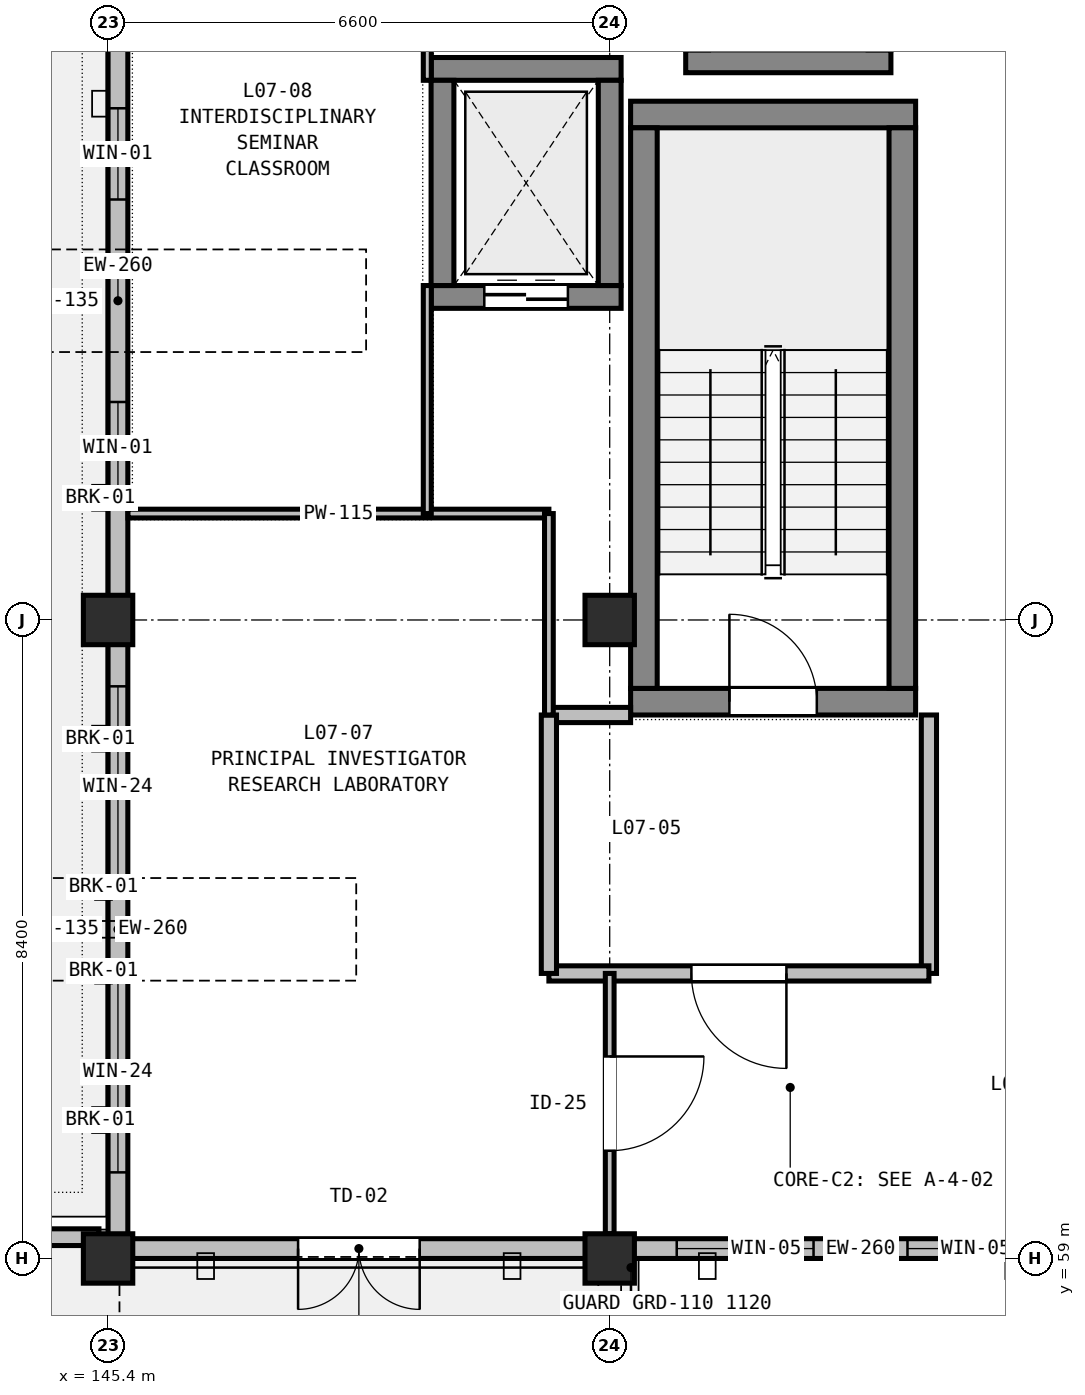
"""IFC4 building model, lengths in metres.
Left out: names, types, materials, properties, quantities, classifications, styles, units other than length and angle.
Written with IfcOpenShell. Run it as: python <this file> out.ifc"""

import sys

from ifc_helpers import new_model, si_unit, direction, frame, frame_2d, origin, origin_2d, place, context, subcontext, project, spatial, rectangle, extrude, element, fill, save


model = new_model("IFC4")
c1 = context("Model", 3, precision=1e-05, world=origin(), true_north=direction((0.0, 1.0)))
c2 = subcontext(c1, "Body", "Model", "MODEL_VIEW")
j1 = project(units=[si_unit("LENGTHUNIT", "METRE"), si_unit("PLANEANGLEUNIT", "RADIAN")], contexts=[c1])
p1 = place(None, origin())
s1 = spatial("IfcSite", under=j1, at=p1, CompositionType="ELEMENT")
p2 = place(p1, origin())
s2 = spatial("IfcBuilding", under=s1, at=p2, CompositionType="ELEMENT")
p3 = place(p2, frame((0.0, 0.0, 32.7)))
s3 = spatial("IfcBuildingStorey", under=s2, at=p3, CompositionType="ELEMENT", Elevation=32.7)
for number, where, z_axis, x_axis in (
    (1, (145.4, 59.0, 0.0), (0.0, 0.0, 1.0), (1.0, 0.0, 0.0)),
    (2, (145.4, 67.4, 0.0), (0.0, 0.0, 1.0), (1.0, 0.0, 0.0)),
    (3, (152.0, 59.0, 0.0), (0.0, 0.0, 1.0), (1.0, 0.0, 0.0)),
    (4, (152.0, 67.4, 0.0), (0.0, 0.0, 1.0), (1.0, 0.0, 0.0)),
):
    element("IfcColumn", number, at=place(p3, frame(where, z_axis=z_axis, x_axis=x_axis)), inside=s3, PredefinedType="COLUMN", context=c2, shape_type="SweptSolid", body=[
        extrude(rectangle(XDim=0.65, YDim=0.65, at=origin_2d()), origin(), (0.0, 0.0, 1.0), 3.9),
    ])
p4 = place(p3, frame((152.275, 66.325, 0.0), z_axis=(0.0, 0.0, 1.0), x_axis=(1.0, 0.0, 0.0)))
e5 = element("IfcWall", 5, at=p4, inside=s3, PredefinedType="SHEAR", context=c2, shape_type="SweptSolid", body=[
    extrude(rectangle(XDim=3.75, YDim=0.35, at=frame_2d((1.875, 0.0))), origin(), (0.0, 0.0, 1.0), 3.9),
])
p5 = place(p4, frame((1.3, 0.0, 0.0)))
e6 = element("IfcOpeningElement", 6, at=p5, cuts=e5, PredefinedType="OPENING", context=c2, shape_type="SweptSolid", body=[
    extrude(rectangle(XDim=1.15, YDim=2.15, at=frame_2d((0.575, 1.075))), frame((0.0, 0.185, 0.0), z_axis=(0.0, -1.0, 0.0), x_axis=(1.0, 0.0, 0.0)), (0.0, 0.0, 1.0), 0.37),
])
p6 = place(p3, frame((152.275, 74.05, 0.0), z_axis=(0.0, 0.0, 1.0), x_axis=(1.0, 0.0, 0.0)))
e7 = element("IfcWall", 7, at=p6, inside=s3, PredefinedType="SHEAR", context=c2, shape_type="SweptSolid", body=[
    extrude(rectangle(XDim=3.75, YDim=0.35, at=frame_2d((1.875, 0.0))), origin(), (0.0, 0.0, 1.0), 3.9),
])
for number, where, z_axis, x_axis in (
    (8, (152.45, 66.5, 0.0), (0.0, 0.0, 1.0), (0.0, 1.0, 0.0)),
    (9, (155.85, 66.5, 0.0), (0.0, 0.0, 1.0), (0.0, 1.0, 0.0)),
):
    element("IfcWall", number, at=place(p3, frame(where, z_axis=z_axis, x_axis=x_axis)), inside=s3, PredefinedType="SHEAR", context=c2, shape_type="SweptSolid", body=[
        extrude(rectangle(XDim=7.375, YDim=0.35, at=frame_2d((3.688, 0.0))), origin(), (0.0, 0.0, 1.0), 3.9),
    ])
p7 = place(p3, frame((149.65, 71.65, 0.0), z_axis=(0.0, 0.0, 1.0), x_axis=(1.0, 0.0, 0.0)))
e10 = element("IfcWall", 10, at=p7, inside=s3, PredefinedType="SHEAR", context=c2, shape_type="SweptSolid", body=[
    extrude(rectangle(XDim=2.5, YDim=0.3, at=frame_2d((1.25, 0.0))), origin(), (0.0, 0.0, 1.0), 3.9),
])
p8 = place(p7, frame((0.7, 0.0, 0.0)))
e11 = element("IfcOpeningElement", 11, at=p8, cuts=e10, PredefinedType="OPENING", context=c2, shape_type="SweptSolid", body=[
    extrude(rectangle(XDim=1.1, YDim=2.1, at=frame_2d((0.55, 1.05))), frame((0.0, 0.16, 0.0), z_axis=(0.0, -1.0, 0.0), x_axis=(1.0, 0.0, 0.0)), (0.0, 0.0, 1.0), 0.32),
])
p9 = place(p3, frame((149.65, 74.65, 0.0), z_axis=(0.0, 0.0, 1.0), x_axis=(1.0, 0.0, 0.0)))
e12 = element("IfcWall", 12, at=p9, inside=s3, PredefinedType="SHEAR", context=c2, shape_type="SweptSolid", body=[
    extrude(rectangle(XDim=2.5, YDim=0.3, at=frame_2d((1.25, 0.0))), origin(), (0.0, 0.0, 1.0), 3.9),
])
for number, where, z_axis, x_axis in (
    (13, (149.8, 71.8, 0.0), (0.0, 0.0, 1.0), (0.0, 1.0, 0.0)),
    (14, (152.0, 71.8, 0.0), (0.0, 0.0, 1.0), (0.0, 1.0, 0.0)),
    (15, (153.0, 74.75, 0.0), (0.0, 0.0, 1.0), (1.0, 0.0, 0.0)),
):
    element("IfcWall", number, at=place(p3, frame(where, z_axis=z_axis, x_axis=x_axis)), inside=s3, PredefinedType="SHEAR", context=c2, shape_type="SweptSolid", body=[
        extrude(rectangle(XDim=2.7, YDim=0.3, at=frame_2d((1.35, 0.0))), origin(), (0.0, 0.0, 1.0), 3.9),
    ])
p10 = place(p3, frame((145.53, 59.26, 0.0), z_axis=(0.0, 0.0, 1.0), x_axis=(0.0, 1.0, 0.0)))
e16 = element("IfcWall", 16, at=p10, inside=s3, PredefinedType="STANDARD", context=c2, shape_type="SweptSolid", body=[
    extrude(rectangle(XDim=8.14, YDim=0.26, at=frame_2d((4.07, 0.0))), origin(), (0.0, 0.0, 1.0), 3.285),
])
p11 = place(p10, frame((0.873, 0.0, 0.9)))
e17 = element("IfcOpeningElement", 17, at=p11, cuts=e16, PredefinedType="OPENING", context=c2, shape_type="SweptSolid", body=[
    extrude(rectangle(XDim=2.65, YDim=1.85, at=frame_2d((1.325, 0.925))), frame((0.0, 0.14, 0.0), z_axis=(0.0, -1.0, 0.0), x_axis=(1.0, 0.0, 0.0)), (0.0, 0.0, 1.0), 0.28),
])
p12 = place(p10, frame((4.617, 0.0, 0.9)))
e18 = element("IfcOpeningElement", 18, at=p12, cuts=e16, PredefinedType="OPENING", context=c2, shape_type="SweptSolid", body=[
    extrude(rectangle(XDim=2.65, YDim=1.85, at=frame_2d((1.325, 0.925))), frame((0.0, 0.14, 0.0), z_axis=(0.0, -1.0, 0.0), x_axis=(1.0, 0.0, 0.0)), (0.0, 0.0, 1.0), 0.28),
])
p13 = place(p3, frame((145.53, 67.4, 0.0), z_axis=(0.0, 0.0, 1.0), x_axis=(0.0, 1.0, 0.0)))
e19 = element("IfcWall", 19, at=p13, inside=s3, PredefinedType="STANDARD", context=c2, shape_type="SweptSolid", body=[
    extrude(rectangle(XDim=8.4, YDim=0.26, at=frame_2d((4.2, 0.0))), origin(), (0.0, 0.0, 1.0), 3.285),
])
p14 = place(p13, frame((1.668, 0.0, 0.9)))
e20 = element("IfcOpeningElement", 20, at=p14, cuts=e19, PredefinedType="OPENING", context=c2, shape_type="SweptSolid", body=[
    extrude(rectangle(XDim=1.2, YDim=2.1, at=frame_2d((0.6, 1.05))), frame((0.0, 0.14, 0.0), z_axis=(0.0, -1.0, 0.0), x_axis=(1.0, 0.0, 0.0)), (0.0, 0.0, 1.0), 0.28),
])
p15 = place(p13, frame((5.532, 0.0, 0.9)))
e21 = element("IfcOpeningElement", 21, at=p15, cuts=e19, PredefinedType="OPENING", context=c2, shape_type="SweptSolid", body=[
    extrude(rectangle(XDim=1.2, YDim=2.1, at=frame_2d((0.6, 1.05))), frame((0.0, 0.14, 0.0), z_axis=(0.0, -1.0, 0.0), x_axis=(1.0, 0.0, 0.0)), (0.0, 0.0, 1.0), 0.28),
])
p16 = place(p3, frame((158.6, 59.13, 0.0), z_axis=(0.0, 0.0, 1.0), x_axis=(-1.0, 0.0, 0.0)))
e22 = element("IfcWall", 22, at=p16, inside=s3, PredefinedType="STANDARD", context=c2, shape_type="SweptSolid", body=[
    extrude(rectangle(XDim=6.6, YDim=0.26, at=frame_2d((3.3, 0.0))), origin(), (0.0, 0.0, 1.0), 3.185),
])
p17 = place(p16, frame((0.882, 0.0, 0.9)))
e23 = element("IfcOpeningElement", 23, at=p17, cuts=e22, PredefinedType="OPENING", context=c2, shape_type="SweptSolid", body=[
    extrude(rectangle(XDim=1.8, YDim=2.1, at=frame_2d((0.9, 1.05))), frame((0.0, 0.14, 0.0), z_axis=(0.0, -1.0, 0.0), x_axis=(1.0, 0.0, 0.0)), (0.0, 0.0, 1.0), 0.28),
])
p18 = place(p16, frame((3.918, 0.0, 0.9)))
e24 = element("IfcOpeningElement", 24, at=p18, cuts=e22, PredefinedType="OPENING", context=c2, shape_type="SweptSolid", body=[
    extrude(rectangle(XDim=1.8, YDim=2.1, at=frame_2d((0.9, 1.05))), frame((0.0, 0.14, 0.0), z_axis=(0.0, -1.0, 0.0), x_axis=(1.0, 0.0, 0.0)), (0.0, 0.0, 1.0), 0.28),
])
p19 = place(p3, frame((152.0, 59.13, 0.0), z_axis=(0.0, 0.0, 1.0), x_axis=(-1.0, 0.0, 0.0)))
e25 = element("IfcWall", 25, at=p19, inside=s3, PredefinedType="STANDARD", context=c2, shape_type="SweptSolid", body=[
    extrude(rectangle(XDim=6.6, YDim=0.26, at=frame_2d((3.3, 0.0))), origin(), (0.0, 0.0, 1.0), 3.185),
])
p20 = place(p19, frame((2.5, 0.0, 0.0)))
e26 = element("IfcOpeningElement", 26, at=p20, cuts=e25, PredefinedType="OPENING", context=c2, shape_type="SweptSolid", body=[
    extrude(rectangle(XDim=1.6, YDim=2.2, at=frame_2d((0.8, 1.1))), frame((0.0, 0.14, 0.0), z_axis=(0.0, -1.0, 0.0), x_axis=(1.0, 0.0, 0.0)), (0.0, 0.0, 1.0), 0.28),
])
p21 = place(p3, frame((138.52, 59.28, 0.0), z_axis=(0.0, 0.0, 1.0), x_axis=(1.0, 0.0, 0.0)))
e27 = element("IfcWall", 27, at=p21, inside=s3, PredefinedType="PARAPET", context=c2, shape_type="SweptSolid", body=[
    extrude(rectangle(XDim=6.76, YDim=0.22, at=frame_2d((3.38, 0.0))), origin(), (0.0, 0.0, 1.0), 1.12),
])
p22 = place(p3, frame((151.2, 66.15, 0.0), z_axis=(0.0, 0.0, 1.0), x_axis=(1.0, 0.0, 0.0)))
e28 = element("IfcWall", 28, at=p22, inside=s3, PredefinedType="PARTITIONING", context=c2, shape_type="SweptSolid", body=[
    extrude(rectangle(XDim=1.075, YDim=0.2, at=frame_2d((0.538, 0.0))), origin(), (0.0, 0.0, 1.0), 3.185),
])
p23 = place(p3, frame((156.2, 66.15, 0.0), z_axis=(0.0, 0.0, 1.0), x_axis=(0.0, -1.0, 0.0)))
e29 = element("IfcWall", 29, at=p23, inside=s3, PredefinedType="PARTITIONING", context=c2, shape_type="SweptSolid", body=[
    extrude(rectangle(XDim=3.4, YDim=0.2, at=frame_2d((1.7, 0.0))), origin(), (0.0, 0.0, 1.0), 3.635),
])
p24 = place(p3, frame((156.2, 62.75, 0.0), z_axis=(0.0, 0.0, 1.0), x_axis=(-1.0, 0.0, 0.0)))
e30 = element("IfcWall", 30, at=p24, inside=s3, PredefinedType="PARTITIONING", context=c2, shape_type="SweptSolid", body=[
    extrude(rectangle(XDim=5.0, YDim=0.2, at=frame_2d((2.5, 0.0))), origin(), (0.0, 0.0, 1.0), 3.185),
])
p25 = place(p24, frame((1.875, 0.0, 0.0)))
e31 = element("IfcOpeningElement", 31, at=p25, cuts=e30, PredefinedType="OPENING", context=c2, shape_type="SweptSolid", body=[
    extrude(rectangle(XDim=1.25, YDim=2.15, at=frame_2d((0.625, 1.075))), frame((0.0, 0.11, 0.0), z_axis=(0.0, -1.0, 0.0), x_axis=(1.0, 0.0, 0.0)), (0.0, 0.0, 1.0), 0.22),
])
p26 = place(p3, frame((151.2, 62.75, 0.0), z_axis=(0.0, 0.0, 1.0), x_axis=(0.0, 1.0, 0.0)))
e32 = element("IfcWall", 32, at=p26, inside=s3, PredefinedType="PARTITIONING", context=c2, shape_type="SweptSolid", body=[
    extrude(rectangle(XDim=3.4, YDim=0.2, at=frame_2d((1.7, 0.0))), origin(), (0.0, 0.0, 1.0), 3.635),
])
p27 = place(p3, frame((145.662, 68.8, 0.0), z_axis=(0.0, 0.0, 1.0), x_axis=(1.0, 0.0, 0.0)))
e33 = element("IfcWall", 33, at=p27, inside=s3, PredefinedType="PARTITIONING", context=c2, shape_type="SweptSolid", body=[
    extrude(rectangle(XDim=5.538, YDim=0.115, at=frame_2d((2.769, 0.0))), origin(), (0.0, 0.0, 1.0), 3.435),
])
p28 = place(p3, frame((151.2, 68.8, 0.0), z_axis=(0.0, 0.0, 1.0), x_axis=(0.0, -1.0, 0.0)))
e34 = element("IfcWall", 34, at=p28, inside=s3, PredefinedType="PARTITIONING", context=c2, shape_type="SweptSolid", body=[
    extrude(rectangle(XDim=2.65, YDim=0.115, at=frame_2d((1.325, 0.0))), origin(), (0.0, 0.0, 1.0), 3.285),
])
p29 = place(p3, frame((152.0, 62.75, 0.0), z_axis=(0.0, 0.0, 1.0), x_axis=(0.0, -1.0, 0.0)))
e35 = element("IfcWall", 35, at=p29, inside=s3, PredefinedType="PARTITIONING", context=c2, shape_type="SweptSolid", body=[
    extrude(rectangle(XDim=3.425, YDim=0.115, at=frame_2d((1.712, 0.0))), origin(), (0.0, 0.0, 1.0), 3.185),
])
p30 = place(p29, frame((1.093, 0.0, 0.0)))
e36 = element("IfcOpeningElement", 36, at=p30, cuts=e35, PredefinedType="OPENING", context=c2, shape_type="SweptSolid", body=[
    extrude(rectangle(XDim=1.24, YDim=2.14, at=frame_2d((0.62, 1.07))), frame((0.0, 0.067, 0.0), z_axis=(0.0, -1.0, 0.0), x_axis=(1.0, 0.0, 0.0)), (0.0, 0.0, 1.0), 0.135),
])
p31 = place(p3, frame((149.6, 78.0, 0.0), z_axis=(0.0, 0.0, 1.0), x_axis=(0.0, -1.0, 0.0)))
e37 = element("IfcWall", 37, at=p31, inside=s3, PredefinedType="PARTITIONING", context=c2, shape_type="SweptSolid", body=[
    extrude(rectangle(XDim=3.5, YDim=0.105, at=frame_2d((1.75, 0.0))), origin(), (0.0, 0.0, 1.0), 3.285),
])
p32 = place(p3, frame((149.6, 71.8, 0.0), z_axis=(0.0, 0.0, 1.0), x_axis=(0.0, -1.0, 0.0)))
e38 = element("IfcWall", 38, at=p32, inside=s3, PredefinedType="PARTITIONING", context=c2, shape_type="SweptSolid", body=[
    extrude(rectangle(XDim=3.0, YDim=0.105, at=frame_2d((1.5, 0.0))), origin(), (0.0, 0.0, 1.0), 3.635),
])
p33 = place(p20, origin())
e39 = element("IfcDoor", 39, at=p33, inside=s3, OperationType="DOUBLE_DOOR_SINGLE_SWING", PredefinedType="DOOR", context=c2, shape_type="SweptSolid", body=[
    extrude(rectangle(XDim=1.6, YDim=2.2, at=frame_2d((0.8, 1.1))), frame((0.0, 0.025, 0.0), z_axis=(0.0, -1.0, 0.0), x_axis=(1.0, 0.0, 0.0)), (0.0, 0.0, 1.0), 0.05),
])
fill(e26, e39)
p34 = place(p11, origin())
e40 = element("IfcWindow", 40, at=p34, inside=s3, PartitioningType="SINGLE_PANEL", PredefinedType="WINDOW", context=c2, shape_type="SweptSolid", body=[
    extrude(rectangle(XDim=2.65, YDim=1.85, at=frame_2d((1.325, 0.925))), frame((0.0, 0.03, 0.0), z_axis=(0.0, -1.0, 0.0), x_axis=(1.0, 0.0, 0.0)), (0.0, 0.0, 1.0), 0.06),
])
fill(e17, e40)
p35 = place(p12, origin())
e41 = element("IfcWindow", 41, at=p35, inside=s3, PartitioningType="SINGLE_PANEL", PredefinedType="WINDOW", context=c2, shape_type="SweptSolid", body=[
    extrude(rectangle(XDim=2.65, YDim=1.85, at=frame_2d((1.325, 0.925))), frame((0.0, 0.03, 0.0), z_axis=(0.0, -1.0, 0.0), x_axis=(1.0, 0.0, 0.0)), (0.0, 0.0, 1.0), 0.06),
])
fill(e18, e41)
p36 = place(p14, origin())
e42 = element("IfcWindow", 42, at=p36, inside=s3, PartitioningType="SINGLE_PANEL", PredefinedType="WINDOW", context=c2, shape_type="SweptSolid", body=[
    extrude(rectangle(XDim=1.2, YDim=2.1, at=frame_2d((0.6, 1.05))), frame((0.0, 0.03, 0.0), z_axis=(0.0, -1.0, 0.0), x_axis=(1.0, 0.0, 0.0)), (0.0, 0.0, 1.0), 0.06),
])
fill(e20, e42)
p37 = place(p15, origin())
e43 = element("IfcWindow", 43, at=p37, inside=s3, PartitioningType="SINGLE_PANEL", PredefinedType="WINDOW", context=c2, shape_type="SweptSolid", body=[
    extrude(rectangle(XDim=1.2, YDim=2.1, at=frame_2d((0.6, 1.05))), frame((0.0, 0.03, 0.0), z_axis=(0.0, -1.0, 0.0), x_axis=(1.0, 0.0, 0.0)), (0.0, 0.0, 1.0), 0.06),
])
fill(e21, e43)
p38 = place(p17, origin())
e44 = element("IfcWindow", 44, at=p38, inside=s3, PartitioningType="SINGLE_PANEL", PredefinedType="WINDOW", context=c2, shape_type="SweptSolid", body=[
    extrude(rectangle(XDim=1.8, YDim=2.1, at=frame_2d((0.9, 1.05))), frame((0.0, 0.03, 0.0), z_axis=(0.0, -1.0, 0.0), x_axis=(1.0, 0.0, 0.0)), (0.0, 0.0, 1.0), 0.06),
])
fill(e23, e44)
p39 = place(p18, origin())
e45 = element("IfcWindow", 45, at=p39, inside=s3, PartitioningType="SINGLE_PANEL", PredefinedType="WINDOW", context=c2, shape_type="SweptSolid", body=[
    extrude(rectangle(XDim=1.8, YDim=2.1, at=frame_2d((0.9, 1.05))), frame((0.0, 0.03, 0.0), z_axis=(0.0, -1.0, 0.0), x_axis=(1.0, 0.0, 0.0)), (0.0, 0.0, 1.0), 0.06),
])
fill(e24, e45)
p40 = place(p5, origin())
e46 = element("IfcDoor", 46, at=p40, inside=s3, OperationType="SINGLE_SWING_LEFT", PredefinedType="DOOR", context=c2, shape_type="SweptSolid", body=[
    extrude(rectangle(XDim=1.15, YDim=2.15, at=frame_2d((0.575, 1.075))), frame((0.0, 0.025, 0.0), z_axis=(0.0, -1.0, 0.0), x_axis=(1.0, 0.0, 0.0)), (0.0, 0.0, 1.0), 0.05),
])
fill(e6, e46)
p41 = place(p8, origin())
e47 = element("IfcDoor", 47, at=p41, inside=s3, OperationType="DOUBLE_DOOR_SLIDING", PredefinedType="DOOR", context=c2, shape_type="SweptSolid", body=[
    extrude(rectangle(XDim=1.1, YDim=2.1, at=frame_2d((0.55, 1.05))), frame((0.0, 0.025, 0.0), z_axis=(0.0, -1.0, 0.0), x_axis=(1.0, 0.0, 0.0)), (0.0, 0.0, 1.0), 0.05),
])
fill(e11, e47)
p42 = place(p25, origin())
e48 = element("IfcDoor", 48, at=p42, inside=s3, OperationType="SINGLE_SWING_LEFT", PredefinedType="DOOR", context=c2, shape_type="SweptSolid", body=[
    extrude(rectangle(XDim=1.25, YDim=2.15, at=frame_2d((0.625, 1.075))), frame((0.0, 0.025, 0.0), z_axis=(0.0, -1.0, 0.0), x_axis=(1.0, 0.0, 0.0)), (0.0, 0.0, 1.0), 0.05),
])
fill(e31, e48)
p43 = place(p30, origin())
e49 = element("IfcDoor", 49, at=p43, inside=s3, OperationType="SINGLE_SWING_LEFT", PredefinedType="DOOR", context=c2, shape_type="SweptSolid", body=[
    extrude(rectangle(XDim=1.24, YDim=2.14, at=frame_2d((0.62, 1.07))), frame((0.0, 0.025, 0.0), z_axis=(0.0, -1.0, 0.0), x_axis=(1.0, 0.0, 0.0)), (0.0, 0.0, 1.0), 0.05),
])
fill(e36, e49)
save(model, sys.argv[1])
